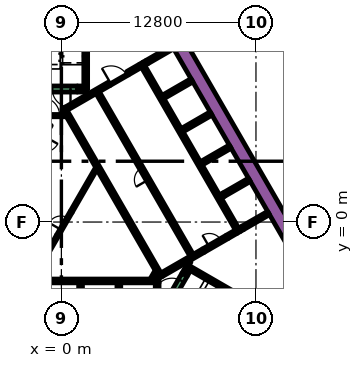
"""IFC4 building model, lengths in metres.
Left out: names, types, materials, properties, quantities, classifications, styles, units other than length and angle.
Written with IfcOpenShell. Run it as: python <this file> out.ifc"""

import sys

from ifc_helpers import new_model, si_unit, direction, frame, frame_2d, origin, place, context, subcontext, project, spatial, polyline, rectangle, outline, extrude, element, fill, save


model = new_model("IFC4")
c1 = context("Model", 3, precision=1e-05, world=origin(), true_north=direction((0.0, 1.0)))
c2 = subcontext(c1, "Body", "Model", "MODEL_VIEW")
j1 = project(units=[si_unit("LENGTHUNIT", "METRE"), si_unit("PLANEANGLEUNIT", "RADIAN")], contexts=[c1])
p1 = place(None, origin())
s1 = spatial("IfcSite", under=j1, at=p1, CompositionType="ELEMENT")
p2 = place(p1, origin())
s2 = spatial("IfcBuilding", under=s1, at=p2, CompositionType="ELEMENT")
p3 = place(p2, frame((0.0, 0.0, 11.4)))
s3 = spatial("IfcBuildingStorey", under=s2, at=p3, CompositionType="ELEMENT", Elevation=11.4)
p4 = place(p3, frame((6.776, 13.364, 0.0), z_axis=(0.0, 0.0, 1.0), x_axis=(0.500004177138, -0.8660229921, 0.0)))
e1 = element("IfcWall", 1, at=p4, inside=s3, PredefinedType="SOLIDWALL", context=c2, shape_type="SweptSolid", body=[
    extrude(rectangle(XDim=20.204, YDim=0.9, at=frame_2d((10.102, 0.0))), origin(), (0.0, 0.0, 1.0), 4.8),
])
p5 = place(p3, frame((11.695, -12.644, 0.0), z_axis=(0.0, 0.0, 1.0), x_axis=(0.500010229568, 0.86601949766, 0.0)))
e2 = element("IfcWall", 2, at=p5, inside=s3, PredefinedType="SOLIDWALL", context=c2, shape_type="SweptSolid", body=[
    extrude(rectangle(XDim=9.326, YDim=0.9, at=frame_2d((4.663, 0.0))), origin(), (0.0, 0.0, 1.0), 4.8),
])
p6 = place(p3, frame((8.334, -2.964, 0.0), z_axis=(0.0, 0.0, 1.0), x_axis=(0.866016039709, -0.500016218704, 0.0)))
e3 = element("IfcWall", 3, at=p6, inside=s3, PredefinedType="SOLIDWALL", context=c2, shape_type="SweptSolid", body=[
    extrude(rectangle(XDim=7.05, YDim=0.25, at=frame_2d((3.525, 0.0))), origin(), (0.0, 0.0, 1.0), 4.8),
])
p7 = place(p3, frame((8.168, -3.503, 0.0), z_axis=(0.0, 0.0, 1.0), x_axis=(0.49972245349, 0.866185586049, 0.0)))
e4 = element("IfcWall", 4, at=p7, inside=s3, PredefinedType="SOLIDWALL", context=c2, shape_type="SweptSolid", body=[
    extrude(rectangle(XDim=0.425, YDim=0.25, at=frame_2d((0.212, 0.0))), origin(), (0.0, 0.0, 1.0), 4.8),
])
p8 = place(p3, frame((1.6, 8.95, 0.0), z_axis=(0.0, 0.0, 1.0), x_axis=(0.0, 1.0, 0.0)))
e5 = element("IfcWall", 5, at=p8, inside=s3, PredefinedType="SOLIDWALL", context=c2, shape_type="SweptSolid", body=[
    extrude(rectangle(XDim=6.8, YDim=0.25, at=frame_2d((3.4, 0.0))), origin(), (0.0, 0.0, 1.0), 4.8),
])
p9 = place(p3, frame((1.05, 8.825, 0.0), z_axis=(0.0, 0.0, 1.0), x_axis=(1.0, 0.0, 0.0)))
e6 = element("IfcWall", 6, at=p9, inside=s3, PredefinedType="SOLIDWALL", context=c2, shape_type="SweptSolid", body=[
    extrude(rectangle(XDim=0.675, YDim=0.25, at=frame_2d((0.337, 0.0))), origin(), (0.0, 0.0, 1.0), 4.8),
])
p10 = place(p3, frame((-5.845, -3.875, 0.0), z_axis=(0.0, 0.0, 1.0), x_axis=(1.0, 0.0, 0.0)))
e7 = element("IfcWall", 7, at=p10, inside=s3, PredefinedType="SOLIDWALL", context=c2, shape_type="SweptSolid", body=[
    extrude(rectangle(XDim=12.27, YDim=0.25, at=frame_2d((6.135, 0.0))), origin(), (0.0, 0.0, 1.0), 4.8),
])
p11 = place(p3, frame((6.3, -7.27, 0.0), z_axis=(0.0, 0.0, 1.0), x_axis=(0.0, 1.0, 0.0)))
e8 = element("IfcWall", 8, at=p11, inside=s3, PredefinedType="SOLIDWALL", context=c2, shape_type="SweptSolid", body=[
    extrude(rectangle(XDim=3.27, YDim=0.25, at=frame_2d((1.635, 0.0))), origin(), (0.0, 0.0, 1.0), 4.8),
])
for number, where, z_axis, x_axis in (
    (9, (3.78, -4.0, 0.0), (0.0, 0.0, 1.0), (0.0, -1.0, 0.0)),
    (10, (1.26, -4.0, 0.0), (0.0, 0.0, 1.0), (0.0, -1.0, 0.0)),
):
    element("IfcWall", number, at=place(p3, frame(where, z_axis=z_axis, x_axis=x_axis)), inside=s3, PredefinedType="SOLIDWALL", context=c2, shape_type="SweptSolid", body=[
        extrude(rectangle(XDim=2.2, YDim=0.25, at=frame_2d((1.1, 0.0))), origin(), (0.0, 0.0, 1.0), 4.8),
    ])
p12 = place(p3, frame((11.678, -0.677, 0.0), z_axis=(0.0, 0.0, 1.0), x_axis=(-0.500003135297, 0.866023593612, 0.0)))
e11 = element("IfcWall", 11, at=p12, inside=s3, PredefinedType="SOLIDWALL", context=c2, shape_type="SweptSolid", body=[
    extrude(rectangle(XDim=12.85, YDim=0.25, at=frame_2d((6.425, 0.0))), origin(), (0.0, 0.0, 1.0), 4.8),
])
for number, where, z_axis, x_axis in (
    (12, (10.464, 1.677, 0.0), (0.0, 0.0, 1.0), (0.866, 0.5, 0.0)),
    (13, (11.894, -0.552, 0.0), (0.0, 0.0, 1.0), (-0.5, 0.866, 0.0)),
):
    element("IfcWall", number, at=place(p3, frame(where, z_axis=z_axis, x_axis=x_axis)), inside=s3, PredefinedType="SOLIDWALL", context=c2, shape_type="SweptSolid", body=[
        extrude(rectangle(XDim=0.25, YDim=0.25, at=frame_2d((0.125, 0.0))), origin(), (0.0, 0.0, 1.0), 4.8),
    ])
for number, where, z_axis, x_axis in (
    (14, (11.94, -0.381, 0.0), (0.0, 0.0, 1.0), (0.866, 0.5, 0.0)),
    (15, (12.369, 2.776, 0.0), (0.0, 0.0, 1.0), (-0.866, -0.5, 0.0)),
):
    element("IfcWall", number, at=place(p3, frame(where, z_axis=z_axis, x_axis=x_axis)), inside=s3, PredefinedType="SOLIDWALL", context=c2, shape_type="SweptSolid", body=[
        extrude(rectangle(XDim=1.95, YDim=0.25, at=frame_2d((0.975, 0.0))), origin(), (0.0, 0.0, 1.0), 4.8),
    ])
p13 = place(p3, frame((11.507, -0.631, 0.0), z_axis=(0.0, 0.0, 1.0), x_axis=(-0.866074517829, -0.49991492233, 0.0)))
e16 = element("IfcWall", 16, at=p13, inside=s3, PredefinedType="SOLIDWALL", context=c2, shape_type="SweptSolid", body=[
    extrude(rectangle(XDim=0.695, YDim=0.25, at=frame_2d((0.348, 0.0))), origin(), (0.0, 0.0, 1.0), 4.8),
])
p14 = place(p3, origin())
e17 = element("IfcWall", 17, at=p14, inside=s3, PredefinedType="SOLIDWALL", context=c2, shape_type="SweptSolid", body=[
    extrude(outline(polyline([(6.552, -3.348), (6.677, -3.564), (6.46, -3.689), (4.897, -0.981), (0.332, 6.925), (0.335, 6.925), (0.335, 6.925), (0.335, 6.925), (0.335, 7.075), (0.335, 7.075), (0.335, 7.075), (0.245, 7.075), (0.079, 7.363), (0.035, 7.439), (0.252, 7.564), (0.377, 7.348), (6.552, -3.348)])), origin(), (0.0, 0.0, 1.0), 4.8),
])
p15 = place(p3, frame((4.358, 9.791, 0.0), z_axis=(0.0, 0.0, 1.0), x_axis=(0.866100000774, 0.49987077196, 0.0)))
e18 = element("IfcWall", 18, at=p15, inside=s3, PredefinedType="SOLIDWALL", context=c2, shape_type="SweptSolid", body=[
    extrude(rectangle(XDim=0.95, YDim=0.25, at=frame_2d((0.475, 0.0))), origin(), (0.0, 0.0, 1.0), 4.8),
])
p16 = place(p3, frame((0.314, 7.456, 0.0), z_axis=(0.0, 0.0, 1.0), x_axis=(0.866013897511, 0.50001992892, 0.0)))
e19 = element("IfcWall", 19, at=p16, inside=s3, PredefinedType="SOLIDWALL", context=c2, shape_type="SweptSolid", body=[
    extrude(rectangle(XDim=3.268, YDim=0.25, at=frame_2d((1.634, 0.0))), origin(), (0.0, 0.0, 1.0), 4.8),
])
p17 = place(p3, frame((6.614, -3.456, 0.0), z_axis=(0.0, 0.0, 1.0), x_axis=(0.86602447079, 0.500001615989, 0.0)))
e20 = element("IfcWall", 20, at=p17, inside=s3, PredefinedType="SOLIDWALL", context=c2, shape_type="SweptSolid", body=[
    extrude(rectangle(XDim=3.154, YDim=0.25, at=frame_2d((1.577, 0.0))), origin(), (0.0, 0.0, 1.0), 4.8),
])
p18 = place(p3, frame((5.469, 10.577, 0.0), z_axis=(0.0, 0.0, 1.0), x_axis=(0.499919672301, -0.866071776036, 0.0)))
e21 = element("IfcWall", 21, at=p18, inside=s3, PredefinedType="SOLIDWALL", context=c2, shape_type="SweptSolid", body=[
    extrude(rectangle(XDim=0.25, YDim=0.25, at=frame_2d((0.125, 0.0))), origin(), (0.0, 0.0, 1.0), 4.8),
])
p19 = place(p3, frame((5.64, 10.531, 0.0), z_axis=(0.0, 0.0, 1.0), x_axis=(0.866000020948, 0.500043961785, 0.0)))
e22 = element("IfcWall", 22, at=p19, inside=s3, PredefinedType="SOLIDWALL", context=c2, shape_type="SweptSolid", body=[
    extrude(rectangle(XDim=1.95, YDim=0.25, at=frame_2d((0.975, 0.0))), origin(), (0.0, 0.0, 1.0), 4.8),
])
for number, where, z_axis, x_axis in (
    (23, (8.589, 9.323, 0.0), (0.0, 0.0, 1.0), (-0.866, -0.5, 0.0)),
    (24, (7.944, 6.041, 0.0), (0.0, 0.0, 1.0), (0.866, 0.5, 0.0)),
    (25, (9.204, 3.859, 0.0), (0.0, 0.0, 1.0), (0.866, 0.5, 0.0)),
):
    element("IfcWall", number, at=place(p3, frame(where, z_axis=z_axis, x_axis=x_axis)), inside=s3, PredefinedType="SOLIDWALL", context=c2, shape_type="SweptSolid", body=[
        extrude(rectangle(XDim=2.2, YDim=0.25, at=frame_2d((1.1, 0.0))), origin(), (0.0, 0.0, 1.0), 4.8),
    ])
p20 = place(p3, frame((5.936, -3.718, 0.0), z_axis=(0.0, 0.0, 1.0), x_axis=(0.499890179513, 0.866088799389, 0.0)))
e26 = element("IfcWall", 26, at=p20, inside=s3, PredefinedType="PARTITIONING", context=c2, shape_type="SweptSolid", body=[
    extrude(rectangle(XDim=0.504, YDim=0.15, at=frame_2d((0.252, 0.0))), origin(), (0.0, 0.0, 1.0), 3.9),
])
p21 = place(p3, frame((8.459, -2.599, 0.0), z_axis=(0.0, 0.0, 1.0), x_axis=(-0.500041054325, -0.866001699761, 0.0)))
e27 = element("IfcWall", 27, at=p21, inside=s3, PredefinedType="PARTITIONING", context=c2, shape_type="SweptSolid", body=[
    extrude(rectangle(XDim=0.929, YDim=0.15, at=frame_2d((0.464, 0.0))), origin(), (0.0, 0.0, 1.0), 4.8),
])
for number, where, z_axis, x_axis in (
    (28, (-1.887, -3.718, 0.0), (0.0, 0.0, 1.0), (0.5, 0.866, 0.0)),
    (29, (0.645, 0.667, 0.0), (0.0, 0.0, 1.0), (0.5, 0.866, 0.0)),
):
    element("IfcWall", number, at=place(p3, frame(where, z_axis=z_axis, x_axis=x_axis)), inside=s3, PredefinedType="PARTITIONING", context=c2, shape_type="SweptSolid", body=[
        extrude(rectangle(XDim=3.263, YDim=0.15, at=frame_2d((1.632, 0.0))), origin(), (0.0, 0.0, 1.0), 3.9),
    ])
p22 = place(p3, frame((1.05, 8.625, 0.0), z_axis=(0.0, 0.0, 1.0), x_axis=(1.0, 0.0, 0.0)))
e30 = element("IfcWall", 30, at=p22, inside=s3, PredefinedType="PARTITIONING", context=c2, shape_type="SweptSolid", body=[
    extrude(rectangle(XDim=0.514, YDim=0.15, at=frame_2d((0.257, 0.0))), origin(), (0.0, 0.0, 1.0), 3.9),
])
p23 = place(p3, frame((8.565, -2.185, 0.0), z_axis=(0.0, 0.0, 1.0), x_axis=(-0.499997954832, 0.866026584559, 0.0)))
e31 = element("IfcWall", 31, at=p23, inside=s3, PredefinedType="SOLIDWALL", context=c2, shape_type="SweptSolid", body=[
    extrude(rectangle(XDim=12.35, YDim=0.25, at=frame_2d((6.175, 0.0))), origin(), (0.0, 0.0, 1.0), 4.8),
])
p24 = place(p23, frame((5.725, 0.0, 0.0)))
e32 = element("IfcOpeningElement", 32, at=p24, cuts=e31, PredefinedType="OPENING", context=c2, shape_type="SweptSolid", body=[
    extrude(rectangle(XDim=0.9, YDim=2.1, at=frame_2d((0.45, 1.05))), frame((0.0, 0.135, 0.0), z_axis=(0.0, -1.0, 0.0), x_axis=(1.0, 0.0, 0.0)), (0.0, 0.0, 1.0), 0.27),
])
p25 = place(p3, frame((7.053, -5.284, 0.0), z_axis=(0.0, 0.0, 1.0), x_axis=(0.500078061341, 0.865980330357, 0.0)))
e33 = element("IfcWall", 33, at=p25, inside=s3, PredefinedType="SOLIDWALL", context=c2, shape_type="SweptSolid", body=[
    extrude(rectangle(XDim=2.1, YDim=0.4, at=frame_2d((1.05, 0.0))), origin(), (0.0, 0.0, 1.0), 4.8),
])
p26 = place(p25, frame((0.45, 0.0, 0.0)))
e34 = element("IfcOpeningElement", 34, at=p26, cuts=e33, PredefinedType="OPENING", context=c2, shape_type="SweptSolid", body=[
    extrude(rectangle(XDim=1.2, YDim=2.1, at=frame_2d((0.6, 1.05))), frame((0.0, 0.21, 0.0), z_axis=(0.0, -1.0, 0.0), x_axis=(1.0, 0.0, 0.0)), (0.0, 0.0, 1.0), 0.42),
])
p27 = place(p3, frame((9.346, -1.879, 0.0), z_axis=(0.0, 0.0, 1.0), x_axis=(0.866047807691, 0.499961193289, 0.0)))
e35 = element("IfcWall", 35, at=p27, inside=s3, PredefinedType="SOLIDWALL", context=c2, shape_type="SweptSolid", body=[
    extrude(rectangle(XDim=1.8, YDim=0.25, at=frame_2d((0.9, 0.0))), origin(), (0.0, 0.0, 1.0), 4.8),
])
p28 = place(p27, frame((0.45, 0.0, 0.0)))
e36 = element("IfcOpeningElement", 36, at=p28, cuts=e35, PredefinedType="OPENING", context=c2, shape_type="SweptSolid", body=[
    extrude(rectangle(XDim=0.9, YDim=2.1, at=frame_2d((0.45, 1.05))), frame((0.0, 0.135, 0.0), z_axis=(0.0, -1.0, 0.0), x_axis=(1.0, 0.0, 0.0)), (0.0, 0.0, 1.0), 0.27),
])
p29 = place(p3, frame((1.05, 8.75, 0.0), z_axis=(0.0, 0.0, 1.0), x_axis=(-1.0, 0.0, 0.0)))
e37 = element("IfcWall", 37, at=p29, inside=s3, PredefinedType="SOLIDWALL", context=c2, shape_type="SweptSolid", body=[
    extrude(rectangle(XDim=2.1, YDim=0.4, at=frame_2d((1.05, 0.0))), origin(), (0.0, 0.0, 1.0), 4.8),
])
p30 = place(p29, frame((0.45, 0.0, 0.0)))
e38 = element("IfcOpeningElement", 38, at=p30, cuts=e37, PredefinedType="OPENING", context=c2, shape_type="SweptSolid", body=[
    extrude(rectangle(XDim=1.2, YDim=2.1, at=frame_2d((0.6, 1.05))), frame((0.0, 0.21, 0.0), z_axis=(0.0, -1.0, 0.0), x_axis=(1.0, 0.0, 0.0)), (0.0, 0.0, 1.0), 0.42),
])
p31 = place(p3, frame((-1.765, 7.0, 0.0), z_axis=(0.0, 0.0, 1.0), x_axis=(1.0, 0.0, 0.0)))
e39 = element("IfcWall", 39, at=p31, inside=s3, PredefinedType="PARTITIONING", context=c2, shape_type="SweptSolid", body=[
    extrude(rectangle(XDim=2.1, YDim=0.15, at=frame_2d((1.05, 0.0))), origin(), (0.0, 0.0, 1.0), 3.9),
])
p32 = place(p31, frame((0.45, 0.0, 0.0)))
e40 = element("IfcOpeningElement", 40, at=p32, cuts=e39, PredefinedType="OPENING", context=c2, shape_type="SweptSolid", body=[
    extrude(rectangle(XDim=1.2, YDim=2.1, at=frame_2d((0.6, 1.05))), frame((0.0, 0.085, 0.0), z_axis=(0.0, -1.0, 0.0), x_axis=(1.0, 0.0, 0.0)), (0.0, 0.0, 1.0), 0.17),
])
p33 = place(p3, frame((3.183, 9.02, 0.0), z_axis=(0.0, 0.0, 1.0), x_axis=(0.866034573852, 0.49998411664, 0.0)))
e41 = element("IfcWall", 41, at=p33, inside=s3, PredefinedType="PARTITIONING", context=c2, shape_type="SweptSolid", body=[
    extrude(rectangle(XDim=1.4, YDim=0.09, at=frame_2d((0.7, 0.0))), origin(), (0.0, 0.0, 1.0), 3.9),
])
p34 = place(p33, frame((0.1, 0.0, 0.0)))
e42 = element("IfcOpeningElement", 42, at=p34, cuts=e41, PredefinedType="OPENING", context=c2, shape_type="SweptSolid", body=[
    extrude(rectangle(XDim=1.2, YDim=2.1, at=frame_2d((0.6, 1.05))), frame((0.0, 0.055, 0.0), z_axis=(0.0, -1.0, 0.0), x_axis=(1.0, 0.0, 0.0)), (0.0, 0.0, 1.0), 0.11),
])
p35 = place(p3, frame((-0.255, -0.892, 0.0), z_axis=(0.0, 0.0, 1.0), x_axis=(0.500062916607, 0.865989075817, 0.0)))
e43 = element("IfcWall", 43, at=p35, inside=s3, PredefinedType="PARTITIONING", context=c2, shape_type="SweptSolid", body=[
    extrude(rectangle(XDim=1.8, YDim=0.15, at=frame_2d((0.9, 0.0))), origin(), (0.0, 0.0, 1.0), 3.9),
])
p36 = place(p35, frame((0.45, 0.0, 0.0)))
e44 = element("IfcOpeningElement", 44, at=p36, cuts=e43, PredefinedType="OPENING", context=c2, shape_type="SweptSolid", body=[
    extrude(rectangle(XDim=0.9, YDim=2.1, at=frame_2d((0.45, 1.05))), frame((0.0, 0.085, 0.0), z_axis=(0.0, -1.0, 0.0), x_axis=(1.0, 0.0, 0.0)), (0.0, 0.0, 1.0), 0.17),
])
p37 = place(p24, origin())
e45 = element("IfcDoor", 45, at=p37, inside=s3, OperationType="SINGLE_SWING_LEFT", PredefinedType="DOOR", context=c2, shape_type="SweptSolid", body=[
    extrude(rectangle(XDim=0.9, YDim=2.1, at=frame_2d((0.45, 1.05))), frame((0.0, 0.025, 0.0), z_axis=(0.0, -1.0, 0.0), x_axis=(1.0, 0.0, 0.0)), (0.0, 0.0, 1.0), 0.05),
])
fill(e32, e45)
p38 = place(p26, origin())
e46 = element("IfcDoor", 46, at=p38, inside=s3, OperationType="SINGLE_SWING_LEFT", PredefinedType="DOOR", context=c2, shape_type="SweptSolid", body=[
    extrude(rectangle(XDim=1.2, YDim=2.1, at=frame_2d((0.6, 1.05))), frame((0.0, 0.025, 0.0), z_axis=(0.0, -1.0, 0.0), x_axis=(1.0, 0.0, 0.0)), (0.0, 0.0, 1.0), 0.05),
])
fill(e34, e46)
p39 = place(p28, origin())
e47 = element("IfcDoor", 47, at=p39, inside=s3, OperationType="SINGLE_SWING_LEFT", PredefinedType="DOOR", context=c2, shape_type="SweptSolid", body=[
    extrude(rectangle(XDim=0.9, YDim=2.1, at=frame_2d((0.45, 1.05))), frame((0.0, 0.025, 0.0), z_axis=(0.0, -1.0, 0.0), x_axis=(1.0, 0.0, 0.0)), (0.0, 0.0, 1.0), 0.05),
])
fill(e36, e47)
p40 = place(p30, origin())
e48 = element("IfcDoor", 48, at=p40, inside=s3, OperationType="SINGLE_SWING_LEFT", PredefinedType="DOOR", context=c2, shape_type="SweptSolid", body=[
    extrude(rectangle(XDim=1.2, YDim=2.1, at=frame_2d((0.6, 1.05))), frame((0.0, 0.025, 0.0), z_axis=(0.0, -1.0, 0.0), x_axis=(1.0, 0.0, 0.0)), (0.0, 0.0, 1.0), 0.05),
])
fill(e38, e48)
p41 = place(p32, origin())
e49 = element("IfcDoor", 49, at=p41, inside=s3, OperationType="SINGLE_SWING_LEFT", PredefinedType="DOOR", context=c2, shape_type="SweptSolid", body=[
    extrude(rectangle(XDim=1.2, YDim=2.1, at=frame_2d((0.6, 1.05))), frame((0.0, 0.025, 0.0), z_axis=(0.0, -1.0, 0.0), x_axis=(1.0, 0.0, 0.0)), (0.0, 0.0, 1.0), 0.05),
])
fill(e40, e49)
p42 = place(p34, origin())
e50 = element("IfcDoor", 50, at=p42, inside=s3, OperationType="SINGLE_SWING_LEFT", PredefinedType="DOOR", context=c2, shape_type="SweptSolid", body=[
    extrude(rectangle(XDim=1.2, YDim=2.1, at=frame_2d((0.6, 1.05))), frame((0.0, 0.025, 0.0), z_axis=(0.0, -1.0, 0.0), x_axis=(1.0, 0.0, 0.0)), (0.0, 0.0, 1.0), 0.05),
])
fill(e42, e50)
p43 = place(p36, origin())
e51 = element("IfcDoor", 51, at=p43, inside=s3, OperationType="SINGLE_SWING_LEFT", PredefinedType="DOOR", context=c2, shape_type="SweptSolid", body=[
    extrude(rectangle(XDim=0.9, YDim=2.1, at=frame_2d((0.45, 1.05))), frame((0.0, 0.025, 0.0), z_axis=(0.0, -1.0, 0.0), x_axis=(1.0, 0.0, 0.0)), (0.0, 0.0, 1.0), 0.05),
])
fill(e44, e51)
save(model, sys.argv[1])
